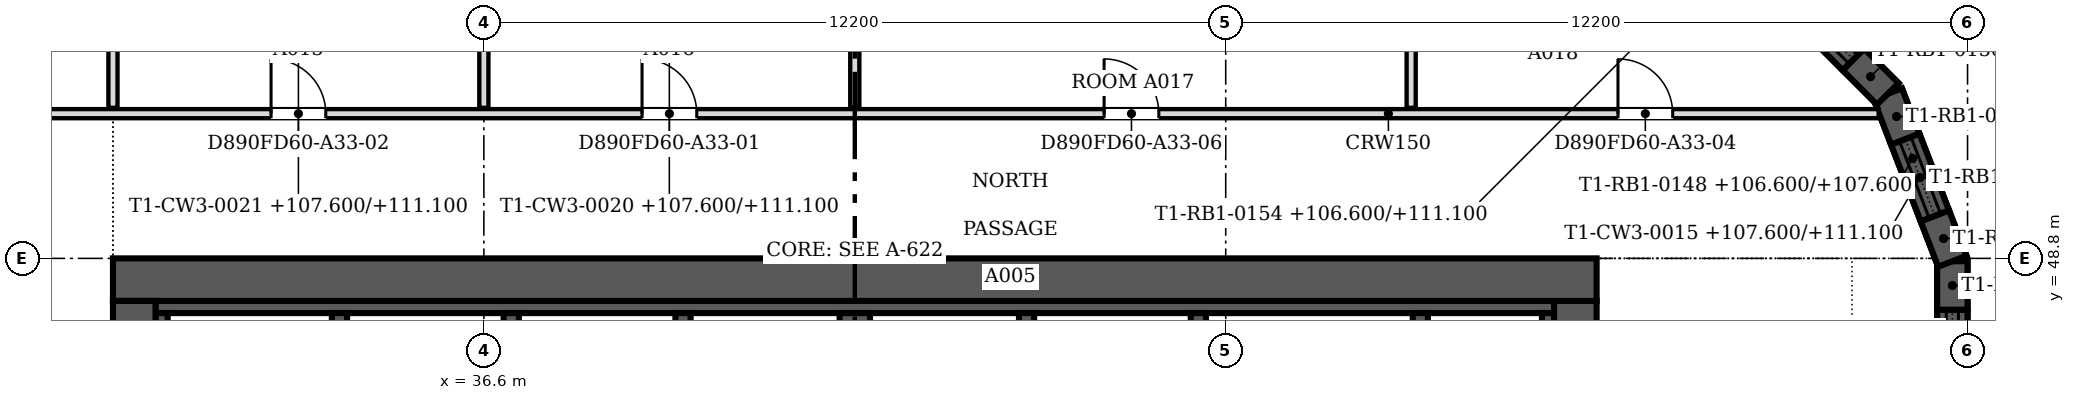
"""IFC4 building model, lengths in metres.
Left out: names, types, materials, properties, quantities, classifications, styles, units other than length and angle.
Written with IfcOpenShell. Run it as: python <this file> out.ifc"""

import sys

from ifc_helpers import new_model, si_unit, direction, frame, frame_2d, origin, place, context, subcontext, project, spatial, polyline, rectangle, outline, extrude, faceted_brep, source, transform, mapped, element, fill, save


model = new_model("IFC4")
c1 = context("Model", 3, precision=1e-05, world=origin(), true_north=direction((0.0, 1.0)))
c2 = subcontext(c1, "Body", "Model", "MODEL_VIEW")
j1 = project(units=[si_unit("LENGTHUNIT", "METRE"), si_unit("PLANEANGLEUNIT", "RADIAN")], contexts=[c1])
p1 = place(None, origin())
s1 = spatial("IfcSite", under=j1, at=p1, CompositionType="ELEMENT")
p2 = place(p1, origin())
s2 = spatial("IfcBuilding", under=s1, at=p2, CompositionType="ELEMENT")
p3 = place(p2, frame((0.0, 0.0, 106.6)))
s3 = spatial("IfcBuildingStorey", under=s2, at=p3, CompositionType="ELEMENT", Elevation=106.6)
m1 = source(origin(), c2, "Body", "Brep", [
    faceted_brep([(0.0, -0.25, 0.0), (0.8, -0.25, 0.0), (0.8, -0.25, 4.5), (0.0, -0.25, 4.5), (0.0, 0.25, 4.5), (0.753, 0.25, 4.5), (0.753, 0.25, 0.0), (0.0, 0.25, 0.0), (0.8, -0.0, 0.0), (0.8, -0.0, 4.5)], [[[0, 1, 2, 3]], [[4, 5, 6, 7]], [[7, 6, 8, 1, 0]], [[9, 2, 1, 8]], [[5, 4, 3, 2, 9]], [[4, 7, 0, 3]], [[8, 6, 5, 9]]]),
])
p4 = place(p3, frame((60.75, 47.953, 0.0), z_axis=(0.0, 0.0, 1.0), x_axis=(0.0, 1.0, 0.0)))
e1 = element("IfcWall", 1, at=p4, inside=s3, PredefinedType="SOLIDWALL", context=c2, shape_type="MappedRepresentation", body=[
    mapped(m1, transform((0.0, 0.0, 0.0), scale=1.0)),
])
m2 = source(origin(), c2, "Body", "Brep", [
    faceted_brep([(0.0, -0.25, 0.0), (1.403, -0.25, 0.0), (1.403, -0.25, 1.0), (0.0, -0.25, 1.0), (0.0, 0.25, 1.0), (1.403, 0.25, 1.0), (1.403, 0.25, 0.0), (0.0, 0.25, 0.0)], [[[0, 1, 2, 3]], [[4, 5, 6, 7]], [[7, 6, 1, 0]], [[5, 4, 3, 2]], [[4, 7, 0, 3]], [[1, 6, 5, 2]]]),
])
p5 = place(p3, frame((60.75, 46.55, 0.0), z_axis=(0.0, 0.0, 1.0), x_axis=(0.0, 1.0, 0.0)))
e2 = element("IfcWall", 2, at=p5, inside=s3, PredefinedType="SOLIDWALL", context=c2, shape_type="MappedRepresentation", body=[
    mapped(m2, transform((0.0, 0.0, 0.0), scale=1.0)),
])
m3 = source(origin(), c2, "Body", "Brep", [
    faceted_brep([(0.0, -0.25, 0.0), (3.003, -0.25, 0.0), (3.003, -0.25, 1.5), (0.0, -0.25, 1.5), (0.0, 0.25, 1.5), (2.957, 0.25, 1.5), (2.957, 0.25, 0.0), (0.0, 0.25, 0.0), (3.003, 0.0, 0.0), (3.003, 0.0, 1.5)], [[[0, 1, 2, 3]], [[4, 5, 6, 7]], [[7, 6, 8, 1, 0]], [[9, 2, 1, 8]], [[5, 4, 3, 2, 9]], [[4, 7, 0, 3]], [[8, 6, 5, 9]]]),
])
p6 = place(p3, frame((60.75, 45.75, 4.5), z_axis=(0.0, 0.0, 1.0), x_axis=(0.0, 1.0, 0.0)))
e3 = element("IfcWall", 3, at=p6, inside=s3, PredefinedType="SOLIDWALL", context=c2, shape_type="MappedRepresentation", body=[
    mapped(m3, transform((0.0, 0.0, 0.0), scale=1.0)),
])
m4 = source(origin(), c2, "Body", "Brep", [
    faceted_brep([(0.0, -0.25, 0.0), (0.8, -0.25, 0.0), (0.8, -0.25, 4.5), (0.0, -0.25, 4.5), (0.047, 0.25, 4.5), (0.8, 0.25, 4.5), (0.8, 0.25, 0.0), (0.047, 0.25, 0.0), (0.0, 0.0, 0.0), (0.0, 0.0, 4.5)], [[[0, 1, 2, 3]], [[4, 5, 6, 7]], [[7, 6, 1, 0, 8]], [[5, 4, 9, 3, 2]], [[8, 0, 3, 9]], [[7, 8, 9, 4]], [[1, 6, 5, 2]]]),
])
p7 = place(p3, frame((60.75, 48.753, 0.0), z_axis=(0.0, 0.0, 1.0), x_axis=(-0.359735468129, 0.933054335486, 0.0)))
e4 = element("IfcWall", 4, at=p7, inside=s3, PredefinedType="SOLIDWALL", context=c2, shape_type="MappedRepresentation", body=[
    mapped(m4, transform((0.0, 0.0, 0.0), scale=1.0)),
])
m5 = source(origin(), c2, "Body", "Brep", [
    faceted_brep([(0.0, -0.25, 0.0), (0.8, -0.25, 0.0), (0.8, -0.25, 4.5), (0.0, -0.25, 4.5), (0.0, 0.25, 4.5), (0.747, 0.25, 4.5), (0.747, 0.25, 0.0), (0.0, 0.25, 0.0), (0.8, -0.0, 0.0), (0.8, -0.0, 4.5)], [[[0, 1, 2, 3]], [[4, 5, 6, 7]], [[7, 6, 8, 1, 0]], [[9, 2, 1, 8]], [[5, 4, 3, 2, 9]], [[4, 7, 0, 3]], [[8, 6, 5, 9]]]),
])
p8 = place(p3, frame((59.976, 50.76, 0.0), z_axis=(0.0, 0.0, 1.0), x_axis=(-0.360001058183, 0.932951894851, 0.0)))
e5 = element("IfcWall", 5, at=p8, inside=s3, PredefinedType="SOLIDWALL", context=c2, shape_type="MappedRepresentation", body=[
    mapped(m5, transform((0.0, 0.0, 0.0), scale=1.0)),
])
m6 = source(origin(), c2, "Body", "SweptSolid", [
    extrude(outline(polyline([(0.0, 0.0), (1.351, 0.0), (1.351, 1.0), (0.0, 1.0), (0.0, 0.0)])), frame((0.0, 0.25, 0.0), z_axis=(0.0, -1.0, 0.0), x_axis=(1.0, 0.0, 0.0)), (0.0, 0.0, 1.0), 0.5),
])
p9 = place(p3, frame((60.462, 49.5, 0.0), z_axis=(0.0, 0.0, 1.0), x_axis=(-0.359923772835, 0.932981713512, 0.0)))
e6 = element("IfcWall", 6, at=p9, inside=s3, PredefinedType="SOLIDWALL", context=c2, shape_type="MappedRepresentation", body=[
    mapped(m6, transform((0.0, 0.0, 0.0), scale=1.0)),
])
m7 = source(origin(), c2, "Body", "Brep", [
    faceted_brep([(0.0, -0.25, 0.0), (2.95, -0.25, 0.0), (2.95, -0.25, 1.5), (0.0, -0.25, 1.5), (0.047, 0.25, 1.5), (2.898, 0.25, 1.5), (2.898, 0.25, 0.0), (0.047, 0.25, 0.0), (2.95, 0.0, 0.0), (0.0, 0.0, 0.0), (2.95, 0.0, 1.5), (0.0, 0.0, 1.5)], [[[0, 1, 2, 3]], [[4, 5, 6, 7]], [[7, 6, 8, 1, 0, 9]], [[10, 2, 1, 8]], [[5, 4, 11, 3, 2, 10]], [[9, 0, 3, 11]], [[7, 9, 11, 4]], [[8, 6, 5, 10]]]),
])
p10 = place(p3, frame((60.75, 48.753, 4.5), z_axis=(0.0, 0.0, 1.0), x_axis=(-0.359877213415, 0.932999673775, 0.0)))
e7 = element("IfcWall", 7, at=p10, inside=s3, PredefinedType="SOLIDWALL", context=c2, shape_type="MappedRepresentation", body=[
    mapped(m7, transform((0.0, 0.0, 0.0), scale=1.0)),
])
m8 = source(origin(), c2, "Body", "Brep", [
    faceted_brep([(0.0, -0.25, 0.0), (0.8, -0.25, 0.0), (0.8, -0.25, 4.5), (0.0, -0.25, 4.5), (0.053, 0.25, 4.5), (0.8, 0.25, 4.5), (0.8, 0.25, 0.0), (0.053, 0.25, 0.0), (0.0, 0.0, 0.0), (0.0, 0.0, 4.5)], [[[0, 1, 2, 3]], [[4, 5, 6, 7]], [[7, 6, 1, 0, 8]], [[5, 4, 9, 3, 2]], [[8, 0, 3, 9]], [[7, 8, 9, 4]], [[1, 6, 5, 2]]]),
])
p11 = place(p3, frame((59.688, 51.506, 0.0), z_axis=(0.0, 0.0, 1.0), x_axis=(-0.707106781187, 0.707106781187, 0.0)))
e8 = element("IfcWall", 8, at=p11, inside=s3, PredefinedType="SOLIDWALL", context=c2, shape_type="MappedRepresentation", body=[
    mapped(m8, transform((0.0, 0.0, 0.0), scale=1.0)),
])
m9 = source(origin(), c2, "Body", "SweptSolid", [
    extrude(outline(polyline([(0.0, 0.0), (1.344, 0.0), (1.344, 1.0), (0.0, 1.0), (0.0, 0.0)])), frame((0.0, 0.25, 0.0), z_axis=(0.0, -1.0, 0.0), x_axis=(1.0, 0.0, 0.0)), (0.0, 0.0, 1.0), 0.5),
])
p12 = place(p3, frame((59.122, 52.072, 0.0), z_axis=(0.0, 0.0, 1.0), x_axis=(-0.707106781187, 0.707106781187, 0.0)))
e9 = element("IfcWall", 9, at=p12, inside=s3, PredefinedType="SOLIDWALL", context=c2, shape_type="MappedRepresentation", body=[
    mapped(m9, transform((0.0, 0.0, 0.0), scale=1.0)),
])
m10 = source(origin(), c2, "Body", "Brep", [
    faceted_brep([(0.0, -0.25, 0.0), (2.944, -0.25, 0.0), (2.944, -0.25, 1.5), (0.0, -0.25, 1.5), (0.053, 0.25, 1.5), (2.891, 0.25, 1.5), (2.891, 0.25, 0.0), (0.053, 0.25, 0.0), (2.944, 0.0, 0.0), (0.0, 0.0, 0.0), (2.944, 0.0, 1.5), (0.0, 0.0, 1.5)], [[[0, 1, 2, 3]], [[4, 5, 6, 7]], [[7, 6, 8, 1, 0, 9]], [[10, 2, 1, 8]], [[5, 4, 11, 3, 2, 10]], [[9, 0, 3, 11]], [[7, 9, 11, 4]], [[8, 6, 5, 10]]]),
])
p13 = place(p3, frame((59.688, 51.506, 4.5), z_axis=(0.0, 0.0, 1.0), x_axis=(-0.707106781187, 0.707106781187, 0.0)))
e10 = element("IfcWall", 10, at=p13, inside=s3, PredefinedType="SOLIDWALL", context=c2, shape_type="MappedRepresentation", body=[
    mapped(m10, transform((0.0, 0.0, 0.0), scale=1.0)),
])
p14 = place(p3, frame((30.85, 25.1, 0.0), z_axis=(0.0, 0.0, 1.0), x_axis=(0.0, 1.0, 0.0)))
e11 = element("IfcWall", 11, at=p14, inside=s3, PredefinedType="SHEAR", context=c2, shape_type="SweptSolid", body=[
    extrude(rectangle(XDim=23.0, YDim=0.7, at=frame_2d((11.5, 0.0))), origin(), (0.0, 0.0, 1.0), 6.0),
])
m11 = source(origin(), c2, "Body", "SweptSolid", [
    extrude(rectangle(XDim=2.1, YDim=2.4, at=frame_2d((1.05, 1.2))), frame((0.0, 0.36, 0.0), z_axis=(0.0, -1.0, 0.0), x_axis=(1.0, 0.0, 0.0)), (0.0, 0.0, 1.0), 0.72),
])
p15 = place(p14, frame((4.7, 0.0, 0.0)))
e12 = element("IfcOpeningElement", 12, at=p15, cuts=e11, PredefinedType="OPENING", context=c2, shape_type="MappedRepresentation", body=[
    mapped(m11, transform((0.0, 0.0, 0.0), scale=1.0)),
])
p16 = place(p14, frame((16.2, 0.0, 0.0)))
e13 = element("IfcOpeningElement", 13, at=p16, cuts=e11, PredefinedType="OPENING", context=c2, shape_type="MappedRepresentation", body=[
    mapped(m11, transform((0.0, 0.0, 0.0), scale=1.0)),
])
p17 = place(p3, frame((30.5, 48.45, 0.0), z_axis=(0.0, 0.0, 1.0), x_axis=(1.0, 0.0, 0.0)))
e14 = element("IfcWall", 14, at=p17, inside=s3, PredefinedType="SHEAR", context=c2, shape_type="SweptSolid", body=[
    extrude(rectangle(XDim=24.4, YDim=0.7, at=frame_2d((12.2, 0.0))), origin(), (0.0, 0.0, 1.0), 6.0),
])
p18 = place(p3, frame((54.55, 48.1, 0.0), z_axis=(0.0, 0.0, 1.0), x_axis=(0.0, -1.0, 0.0)))
e15 = element("IfcWall", 15, at=p18, inside=s3, PredefinedType="SHEAR", context=c2, shape_type="SweptSolid", body=[
    extrude(rectangle(XDim=23.0, YDim=0.7, at=frame_2d((11.5, 0.0))), origin(), (0.0, 0.0, 1.0), 6.0),
])
m12 = source(origin(), c2, "Body", "SweptSolid", [
    extrude(rectangle(XDim=1.2, YDim=2.1, at=frame_2d((0.6, 1.05))), frame((0.0, 0.36, 0.0), z_axis=(0.0, -1.0, 0.0), x_axis=(1.0, 0.0, 0.0)), (0.0, 0.0, 1.0), 0.72),
])
p19 = place(p18, frame((4.8, 0.0, 0.0)))
e16 = element("IfcOpeningElement", 16, at=p19, cuts=e15, PredefinedType="OPENING", context=c2, shape_type="MappedRepresentation", body=[
    mapped(m12, transform((0.0, 0.0, 0.0), scale=1.0)),
])
p20 = place(p3, frame((31.2, 48.0, 0.0), z_axis=(0.0, 0.0, 1.0), x_axis=(1.0, 0.0, 0.0)))
e17 = element("IfcWall", 17, at=p20, inside=s3, PredefinedType="SOLIDWALL", context=c2, shape_type="SweptSolid", body=[
    extrude(rectangle(XDim=23.0, YDim=0.2, at=frame_2d((11.5, 0.0))), origin(), (0.0, 0.0, 1.0), 6.0),
])
p21 = place(p3, frame((31.3, 43.4, 0.0), z_axis=(0.0, 0.0, 1.0), x_axis=(0.0, 1.0, 0.0)))
e18 = element("IfcWall", 18, at=p21, inside=s3, PredefinedType="SOLIDWALL", context=c2, shape_type="SweptSolid", body=[
    extrude(rectangle(XDim=4.5, YDim=0.2, at=frame_2d((2.25, 0.0))), origin(), (0.0, 0.0, 1.0), 6.0),
])
p22 = place(p3, frame((54.1, 43.3, 0.0), z_axis=(0.0, 0.0, 1.0), x_axis=(0.0, 1.0, 0.0)))
e19 = element("IfcWall", 19, at=p22, inside=s3, PredefinedType="SOLIDWALL", context=c2, shape_type="SweptSolid", body=[
    extrude(rectangle(XDim=4.6, YDim=0.2, at=frame_2d((2.3, 0.0))), origin(), (0.0, 0.0, 1.0), 6.0),
])
p23 = place(p3, frame((42.7, 44.9, 0.0), z_axis=(0.0, 0.0, 1.0), x_axis=(0.0, 1.0, 0.0)))
e20 = element("IfcWall", 20, at=p23, inside=s3, PredefinedType="SHEAR", context=c2, shape_type="SweptSolid", body=[
    extrude(rectangle(XDim=3.0, YDim=0.5, at=frame_2d((1.5, 0.0))), origin(), (0.0, 0.0, 1.0), 6.0),
])
p24 = place(p3, frame((48.35, 47.9, 0.0), z_axis=(0.0, 0.0, 1.0), x_axis=(0.0, -1.0, 0.0)))
e21 = element("IfcWall", 21, at=p24, inside=s3, PredefinedType="SOLIDWALL", context=c2, shape_type="SweptSolid", body=[
    extrude(rectangle(XDim=11.05, YDim=0.25, at=frame_2d((5.525, 0.0))), origin(), (0.0, 0.0, 1.0), 6.0),
])
m13 = source(origin(), c2, "Body", "SweptSolid", [
    extrude(rectangle(XDim=1.2, YDim=2.1, at=frame_2d((0.6, 1.05))), frame((0.0, 0.135, 0.0), z_axis=(0.0, -1.0, 0.0), x_axis=(1.0, 0.0, 0.0)), (0.0, 0.0, 1.0), 0.27),
])
p25 = place(p24, frame((6.625, 0.0, 0.0)))
e22 = element("IfcOpeningElement", 22, at=p25, cuts=e21, PredefinedType="OPENING", context=c2, shape_type="MappedRepresentation", body=[
    mapped(m13, transform((0.0, 0.0, 0.0), scale=1.0)),
])
p26 = place(p3, frame((52.0, 39.925, 0.0), z_axis=(0.0, 0.0, 1.0), x_axis=(0.0, 1.0, 0.0)))
e23 = element("IfcWall", 23, at=p26, inside=s3, PredefinedType="SOLIDWALL", context=c2, shape_type="SweptSolid", body=[
    extrude(rectangle(XDim=7.975, YDim=0.25, at=frame_2d((3.987, 0.0))), origin(), (0.0, 0.0, 1.0), 6.0),
])
p27 = place(p26, frame((0.15, 0.0, 0.0)))
e24 = element("IfcOpeningElement", 24, at=p27, cuts=e23, PredefinedType="OPENING", context=c2, shape_type="MappedRepresentation", body=[
    mapped(m13, transform((0.0, 0.0, 0.0), scale=1.0)),
])
for number, where, z_axis, x_axis in (
    (25, (34.225, 45.025, 0.0), (0.0, 0.0, 1.0), (0.0, 1.0, 0.0)),
    (26, (37.05, 45.025, 0.0), (0.0, 0.0, 1.0), (0.0, 1.0, 0.0)),
    (27, (39.875, 45.025, 0.0), (0.0, 0.0, 1.0), (0.0, 1.0, 0.0)),
    (28, (45.525, 45.025, 0.0), (0.0, 0.0, 1.0), (0.0, 1.0, 0.0)),
):
    element("IfcWall", number, at=place(p3, frame(where, z_axis=z_axis, x_axis=x_axis)), inside=s3, PredefinedType="SOLIDWALL", context=c2, shape_type="SweptSolid", body=[
        extrude(rectangle(XDim=2.875, YDim=0.25, at=frame_2d((1.438, 0.0))), origin(), (0.0, 0.0, 1.0), 6.0),
    ])
p28 = place(p3, frame((28.176, 51.18, 0.0), z_axis=(0.0, 0.0, 1.0), x_axis=(1.0, 0.0, 0.0)))
e29 = element("IfcWall", 29, at=p28, inside=s3, PredefinedType="PARTITIONING", context=c2, shape_type="SweptSolid", body=[
    extrude(rectangle(XDim=31.362, YDim=0.15, at=frame_2d((15.681, 0.0))), origin(), (0.0, 0.0, 1.0), 5.167),
])
m14 = source(origin(), c2, "Body", "SweptSolid", [
    extrude(rectangle(XDim=0.9, YDim=2.1, at=frame_2d((0.45, 1.05))), frame((0.0, 0.085, 0.0), z_axis=(0.0, -1.0, 0.0), x_axis=(1.0, 0.0, 0.0)), (0.0, 0.0, 1.0), 0.17),
])
p29 = place(p28, frame((11.025, 0.0, 0.0)))
e30 = element("IfcOpeningElement", 30, at=p29, cuts=e29, PredefinedType="OPENING", context=c2, shape_type="MappedRepresentation", body=[
    mapped(m14, transform((0.0, 0.0, 0.0), scale=1.0)),
])
p30 = place(p28, frame((4.924, 0.0, 0.0)))
e31 = element("IfcOpeningElement", 31, at=p30, cuts=e29, PredefinedType="OPENING", context=c2, shape_type="MappedRepresentation", body=[
    mapped(m14, transform((0.0, 0.0, 0.0), scale=1.0)),
])
p31 = place(p28, frame((27.075, 0.0, 0.0)))
e32 = element("IfcOpeningElement", 32, at=p31, cuts=e29, PredefinedType="OPENING", context=c2, shape_type="MappedRepresentation", body=[
    mapped(m14, transform((0.0, 0.0, 0.0), scale=1.0)),
])
p32 = place(p28, frame((18.624, 0.0, 0.0)))
e33 = element("IfcOpeningElement", 33, at=p32, cuts=e29, PredefinedType="OPENING", context=c2, shape_type="MappedRepresentation", body=[
    mapped(m14, transform((0.0, 0.0, 0.0), scale=1.0)),
])
for number, where, z_axis, x_axis in (
    (34, (30.5, 51.276, 0.0), (0.0, 0.0, 1.0), (0.0, 1.0, 0.0)),
    (35, (36.6, 51.276, 0.0), (0.0, 0.0, 1.0), (0.0, 1.0, 0.0)),
    (36, (42.7, 51.276, 0.0), (0.0, 0.0, 1.0), (0.0, 1.0, 0.0)),
    (37, (51.85, 51.276, 0.0), (0.0, 0.0, 1.0), (0.0, 1.0, 0.0)),
):
    element("IfcWall", number, at=place(p3, frame(where, z_axis=z_axis, x_axis=x_axis)), inside=s3, PredefinedType="PARTITIONING", context=c2, shape_type="SweptSolid", body=[
        extrude(rectangle(XDim=3.124, YDim=0.15, at=frame_2d((1.562, 0.0))), origin(), (0.0, 0.0, 1.0), 5.167),
    ])
m15 = source(origin(), c2, "Body", "SweptSolid", [
    extrude(rectangle(XDim=0.9, YDim=2.1, at=frame_2d((0.45, 1.05))), frame((0.0, 0.025, 0.0), z_axis=(0.0, -1.0, 0.0), x_axis=(1.0, 0.0, 0.0)), (0.0, 0.0, 1.0), 0.05),
])
p33 = place(p29, origin())
e38 = element("IfcDoor", 38, at=p33, inside=s3, OperationType="SINGLE_SWING_LEFT", PredefinedType="DOOR", context=c2, shape_type="MappedRepresentation", body=[
    mapped(m15, transform((0.0, 0.0, 0.0), scale=1.0)),
])
fill(e30, e38)
p34 = place(p30, origin())
e39 = element("IfcDoor", 39, at=p34, inside=s3, OperationType="SINGLE_SWING_LEFT", PredefinedType="DOOR", context=c2, shape_type="MappedRepresentation", body=[
    mapped(m15, transform((0.0, 0.0, 0.0), scale=1.0)),
])
fill(e31, e39)
p35 = place(p31, origin())
e40 = element("IfcDoor", 40, at=p35, inside=s3, OperationType="SINGLE_SWING_LEFT", PredefinedType="DOOR", context=c2, shape_type="MappedRepresentation", body=[
    mapped(m15, transform((0.0, 0.0, 0.0), scale=1.0)),
])
fill(e32, e40)
p36 = place(p32, origin())
e41 = element("IfcDoor", 41, at=p36, inside=s3, OperationType="SINGLE_SWING_LEFT", PredefinedType="DOOR", context=c2, shape_type="MappedRepresentation", body=[
    mapped(m15, transform((0.0, 0.0, 0.0), scale=1.0)),
])
fill(e33, e41)
save(model, sys.argv[1])
